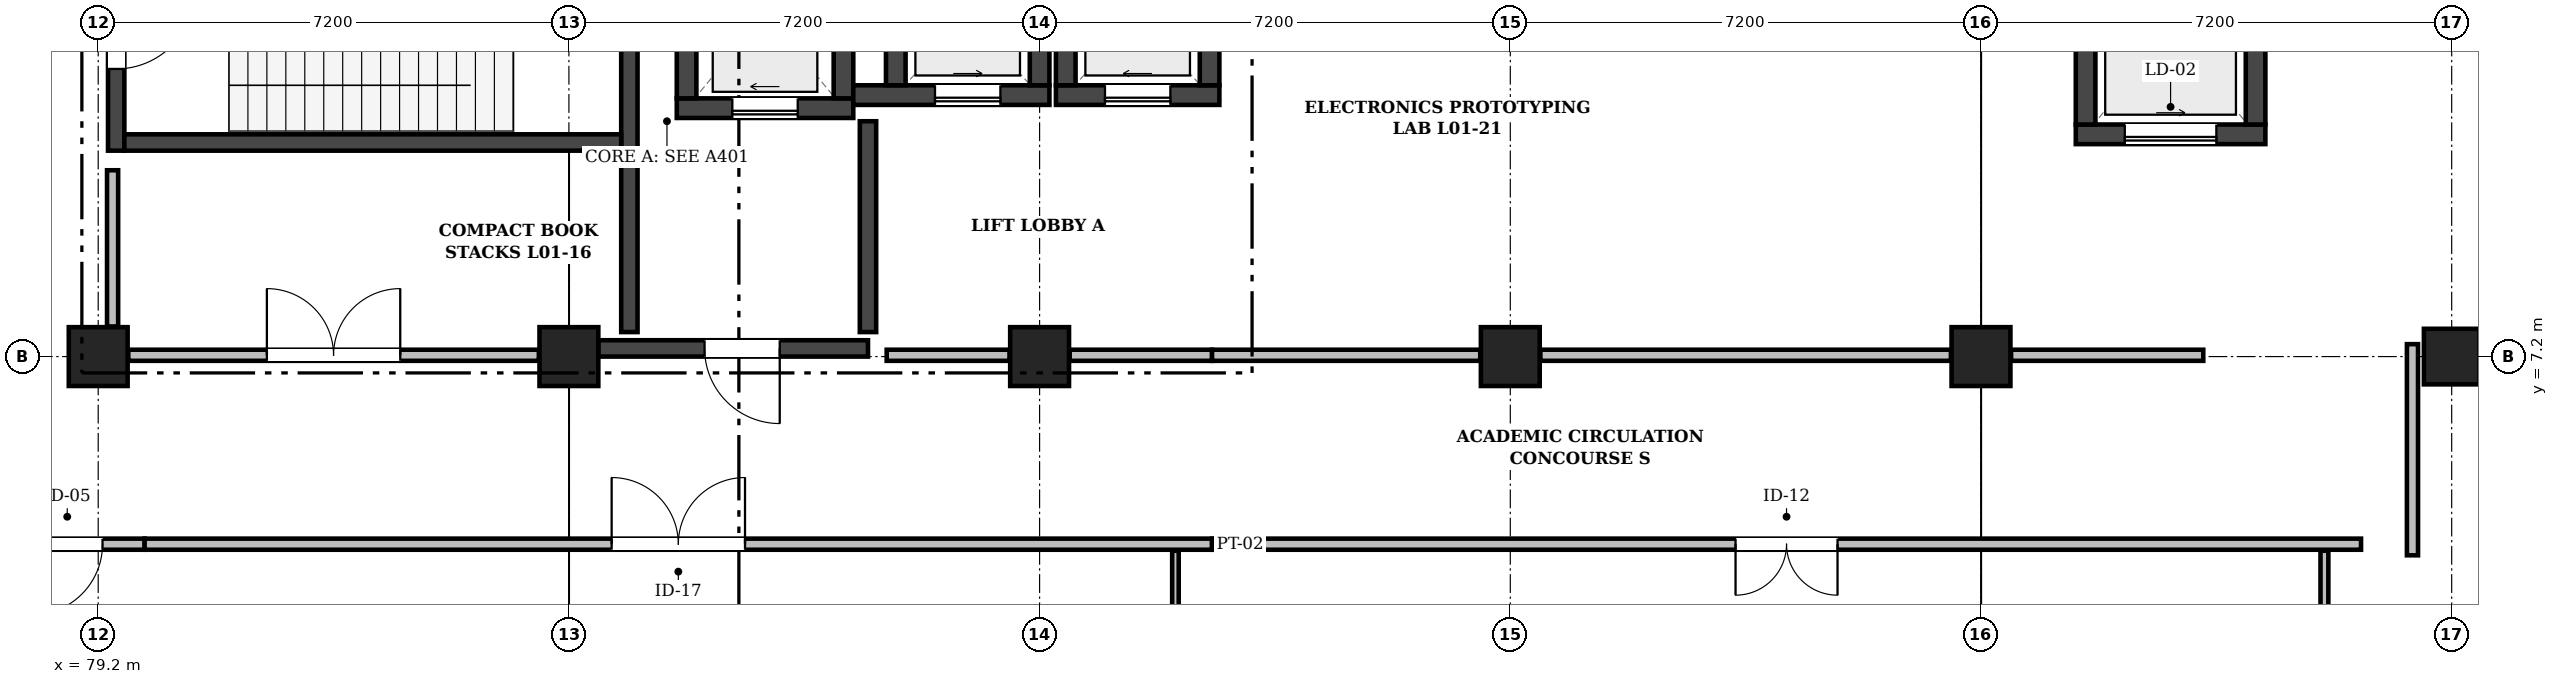
"""IFC4 building model, lengths in metres.
Left out: names, types, materials, properties, quantities, classifications, styles, units other than length and angle.
Written with IfcOpenShell. Run it as: python <this file> out.ifc"""

import sys

from ifc_helpers import new_model, si_unit, direction, frame, frame_2d, origin, origin_2d, place, context, subcontext, project, spatial, rectangle, extrude, element, fill, save


model = new_model("IFC4")
c1 = context("Model", 3, precision=1e-05, world=origin(), true_north=direction((0.0, 1.0)))
c2 = subcontext(c1, "Body", "Model", "MODEL_VIEW")
j1 = project(units=[si_unit("LENGTHUNIT", "METRE"), si_unit("PLANEANGLEUNIT", "RADIAN")], contexts=[c1])
p1 = place(None, origin())
s1 = spatial("IfcSite", under=j1, at=p1, CompositionType="ELEMENT")
p2 = place(p1, origin())
s2 = spatial("IfcBuilding", under=s1, at=p2, CompositionType="ELEMENT")
p3 = place(p2, frame((0.0, 0.0, 4.8)))
s3 = spatial("IfcBuildingStorey", under=s2, at=p3, CompositionType="ELEMENT", Elevation=4.8)
for number, where, z_axis, x_axis in (
    (1, (79.2, 7.2, 0.0), (0.0, 0.0, 1.0), (1.0, 0.0, 0.0)),
    (2, (86.4, 7.2, 0.0), (0.0, 0.0, 1.0), (1.0, 0.0, 0.0)),
    (3, (93.6, 7.2, 0.0), (0.0, 0.0, 1.0), (1.0, 0.0, 0.0)),
    (4, (100.8, 7.2, 0.0), (0.0, 0.0, 1.0), (1.0, 0.0, 0.0)),
    (5, (108.0, 7.2, 0.0), (0.0, 0.0, 1.0), (1.0, 0.0, 0.0)),
):
    element("IfcColumn", number, at=place(p3, frame(where, z_axis=z_axis, x_axis=x_axis)), inside=s3, PredefinedType="COLUMN", context=c2, shape_type="SweptSolid", body=[
        extrude(rectangle(XDim=0.9, YDim=0.9, at=origin_2d()), origin(), (0.0, 0.0, 1.0), 4.8),
    ])
p4 = place(p3, frame((115.2, 7.2, 0.0), z_axis=(0.0, 0.0, 1.0), x_axis=(1.0, 0.0, 0.0)))
e6 = element("IfcColumn", 6, at=p4, inside=s3, PredefinedType="COLUMN", context=c2, shape_type="SweptSolid", body=[
    extrude(rectangle(XDim=0.85, YDim=0.85, at=origin_2d()), origin(), (0.0, 0.0, 1.0), 4.8),
])
p5 = place(p3, frame((88.05, 11.0, 0.0), z_axis=(0.0, 0.0, 1.0), x_axis=(1.0, 0.0, 0.0)))
e7 = element("IfcWall", 7, at=p5, inside=s3, PredefinedType="SHEAR", context=c2, shape_type="SweptSolid", body=[
    extrude(rectangle(XDim=2.7, YDim=0.3, at=frame_2d((1.35, 0.0))), origin(), (0.0, 0.0, 1.0), 4.55),
])
p6 = place(p5, frame((0.85, 0.0, 0.0)))
e8 = element("IfcOpeningElement", 8, at=p6, cuts=e7, PredefinedType="OPENING", context=c2, shape_type="SweptSolid", body=[
    extrude(rectangle(XDim=1.0, YDim=2.1, at=frame_2d((0.5, 1.05))), frame((0.0, 0.162, 0.0), z_axis=(0.0, -1.0, 0.0), x_axis=(1.0, 0.0, 0.0)), (0.0, 0.0, 1.0), 0.324),
])
for number, where, z_axis, x_axis in (
    (9, (88.2, 11.15, 0.0), (0.0, 0.0, 1.0), (0.0, 1.0, 0.0)),
    (10, (90.6, 11.15, 0.0), (0.0, 0.0, 1.0), (0.0, 1.0, 0.0)),
):
    element("IfcWall", number, at=place(p3, frame(where, z_axis=z_axis, x_axis=x_axis)), inside=s3, PredefinedType="SHEAR", context=c2, shape_type="SweptSolid", body=[
        extrude(rectangle(XDim=2.6, YDim=0.3, at=frame_2d((1.3, 0.0))), origin(), (0.0, 0.0, 1.0), 4.55),
    ])
p7 = place(p3, frame((90.75, 11.2, 0.0), z_axis=(0.0, 0.0, 1.0), x_axis=(1.0, 0.0, 0.0)))
e11 = element("IfcWall", 11, at=p7, inside=s3, PredefinedType="SHEAR", context=c2, shape_type="SweptSolid", body=[
    extrude(rectangle(XDim=3.0, YDim=0.3, at=frame_2d((1.5, 0.0))), origin(), (0.0, 0.0, 1.0), 4.55),
])
p8 = place(p7, frame((1.25, 0.0, 0.0)))
e12 = element("IfcOpeningElement", 12, at=p8, cuts=e11, PredefinedType="OPENING", context=c2, shape_type="SweptSolid", body=[
    extrude(rectangle(XDim=1.0, YDim=2.1, at=frame_2d((0.5, 1.05))), frame((0.0, 0.162, 0.0), z_axis=(0.0, -1.0, 0.0), x_axis=(1.0, 0.0, 0.0)), (0.0, 0.0, 1.0), 0.324),
])
for number, where, z_axis, x_axis in (
    (13, (91.4, 11.35, 0.0), (0.0, 0.0, 1.0), (0.0, 1.0, 0.0)),
    (14, (93.6, 11.35, 0.0), (0.0, 0.0, 1.0), (0.0, 1.0, 0.0)),
):
    element("IfcWall", number, at=place(p3, frame(where, z_axis=z_axis, x_axis=x_axis)), inside=s3, PredefinedType="SHEAR", context=c2, shape_type="SweptSolid", body=[
        extrude(rectangle(XDim=2.1, YDim=0.3, at=frame_2d((1.05, 0.0))), origin(), (0.0, 0.0, 1.0), 4.55),
    ])
p9 = place(p3, frame((93.85, 11.2, 0.0), z_axis=(0.0, 0.0, 1.0), x_axis=(1.0, 0.0, 0.0)))
e15 = element("IfcWall", 15, at=p9, inside=s3, PredefinedType="SHEAR", context=c2, shape_type="SweptSolid", body=[
    extrude(rectangle(XDim=2.5, YDim=0.3, at=frame_2d((1.25, 0.0))), origin(), (0.0, 0.0, 1.0), 4.55),
])
p10 = place(p9, frame((0.75, 0.0, 0.0)))
e16 = element("IfcOpeningElement", 16, at=p10, cuts=e15, PredefinedType="OPENING", context=c2, shape_type="SweptSolid", body=[
    extrude(rectangle(XDim=1.0, YDim=2.1, at=frame_2d((0.5, 1.05))), frame((0.0, 0.162, 0.0), z_axis=(0.0, -1.0, 0.0), x_axis=(1.0, 0.0, 0.0)), (0.0, 0.0, 1.0), 0.324),
])
for number, where, z_axis, x_axis in (
    (17, (94.0, 11.35, 0.0), (0.0, 0.0, 1.0), (0.0, 1.0, 0.0)),
    (18, (96.2, 11.35, 0.0), (0.0, 0.0, 1.0), (0.0, 1.0, 0.0)),
):
    element("IfcWall", number, at=place(p3, frame(where, z_axis=z_axis, x_axis=x_axis)), inside=s3, PredefinedType="SHEAR", context=c2, shape_type="SweptSolid", body=[
        extrude(rectangle(XDim=2.1, YDim=0.3, at=frame_2d((1.05, 0.0))), origin(), (0.0, 0.0, 1.0), 4.55),
    ])
p11 = place(p3, frame((109.45, 10.6, 0.0), z_axis=(0.0, 0.0, 1.0), x_axis=(1.0, 0.0, 0.0)))
e19 = element("IfcWall", 19, at=p11, inside=s3, PredefinedType="SHEAR", context=c2, shape_type="SweptSolid", body=[
    extrude(rectangle(XDim=2.9, YDim=0.3, at=frame_2d((1.45, 0.0))), origin(), (0.0, 0.0, 1.0), 4.55),
])
p12 = place(p11, frame((0.75, 0.0, 0.0)))
e20 = element("IfcOpeningElement", 20, at=p12, cuts=e19, PredefinedType="OPENING", context=c2, shape_type="SweptSolid", body=[
    extrude(rectangle(XDim=1.4, YDim=2.2, at=frame_2d((0.7, 1.1))), frame((0.0, 0.162, 0.0), z_axis=(0.0, -1.0, 0.0), x_axis=(1.0, 0.0, 0.0)), (0.0, 0.0, 1.0), 0.324),
])
for number, where, z_axis, x_axis in (
    (21, (109.6, 10.75, 0.0), (0.0, 0.0, 1.0), (0.0, 1.0, 0.0)),
    (22, (112.2, 10.75, 0.0), (0.0, 0.0, 1.0), (0.0, 1.0, 0.0)),
):
    element("IfcWall", number, at=place(p3, frame(where, z_axis=z_axis, x_axis=x_axis)), inside=s3, PredefinedType="SHEAR", context=c2, shape_type="SweptSolid", body=[
        extrude(rectangle(XDim=2.9, YDim=0.3, at=frame_2d((1.45, 0.0))), origin(), (0.0, 0.0, 1.0), 4.55),
    ])
p13 = place(p3, frame((79.475, 10.35, 0.0), z_axis=(0.0, 0.0, 1.0), x_axis=(0.0, 1.0, 0.0)))
e23 = element("IfcWall", 23, at=p13, inside=s3, PredefinedType="SHEAR", context=c2, shape_type="SweptSolid", body=[
    extrude(rectangle(XDim=3.7, YDim=0.25, at=frame_2d((1.85, 0.0))), origin(), (0.0, 0.0, 1.0), 4.55),
])
p14 = place(p13, frame((1.25, 0.0, 0.0)))
e24 = element("IfcOpeningElement", 24, at=p14, cuts=e23, PredefinedType="OPENING", context=c2, shape_type="SweptSolid", body=[
    extrude(rectangle(XDim=1.2, YDim=2.15, at=frame_2d((0.6, 1.075))), frame((0.0, 0.137, 0.0), z_axis=(0.0, -1.0, 0.0), x_axis=(1.0, 0.0, 0.0)), (0.0, 0.0, 1.0), 0.274),
])
p15 = place(p3, frame((87.325, 10.35, 0.0), z_axis=(0.0, 0.0, 1.0), x_axis=(0.0, 1.0, 0.0)))
e25 = element("IfcWall", 25, at=p15, inside=s3, PredefinedType="SHEAR", context=c2, shape_type="SweptSolid", body=[
    extrude(rectangle(XDim=3.7, YDim=0.25, at=frame_2d((1.85, 0.0))), origin(), (0.0, 0.0, 1.0), 4.55),
])
p16 = place(p3, frame((79.6, 10.475, 0.0), z_axis=(0.0, 0.0, 1.0), x_axis=(1.0, 0.0, 0.0)))
e26 = element("IfcWall", 26, at=p16, inside=s3, PredefinedType="SHEAR", context=c2, shape_type="SweptSolid", body=[
    extrude(rectangle(XDim=7.6, YDim=0.25, at=frame_2d((3.8, 0.0))), origin(), (0.0, 0.0, 1.0), 4.55),
])
p17 = place(p3, frame((86.85, 7.325, 0.0), z_axis=(0.0, 0.0, 1.0), x_axis=(1.0, 0.0, 0.0)))
e27 = element("IfcWall", 27, at=p17, inside=s3, PredefinedType="SHEAR", context=c2, shape_type="SweptSolid", body=[
    extrude(rectangle(XDim=4.125, YDim=0.25, at=frame_2d((2.062, 0.0))), origin(), (0.0, 0.0, 1.0), 4.55),
])
p18 = place(p17, frame((1.625, 0.0, 0.0)))
e28 = element("IfcOpeningElement", 28, at=p18, cuts=e27, PredefinedType="OPENING", context=c2, shape_type="SweptSolid", body=[
    extrude(rectangle(XDim=1.15, YDim=2.15, at=frame_2d((0.575, 1.075))), frame((0.0, 0.137, 0.0), z_axis=(0.0, -1.0, 0.0), x_axis=(1.0, 0.0, 0.0)), (0.0, 0.0, 1.0), 0.274),
])
p19 = place(p3, frame((87.325, 7.575, 0.0), z_axis=(0.0, 0.0, 1.0), x_axis=(0.0, 1.0, 0.0)))
e29 = element("IfcWall", 29, at=p19, inside=s3, PredefinedType="SHEAR", context=c2, shape_type="SweptSolid", body=[
    extrude(rectangle(XDim=2.77, YDim=0.25, at=frame_2d((1.385, 0.0))), origin(), (0.0, 0.0, 1.0), 4.55),
])
p20 = place(p3, frame((90.975, 7.575, 0.0), z_axis=(0.0, 0.0, 1.0), x_axis=(0.0, 1.0, 0.0)))
e30 = element("IfcWall", 30, at=p20, inside=s3, PredefinedType="SHEAR", context=c2, shape_type="SweptSolid", body=[
    extrude(rectangle(XDim=3.225, YDim=0.25, at=frame_2d((1.613, 0.0))), origin(), (0.0, 0.0, 1.0), 4.55),
])
p21 = place(p3, frame((79.42, 7.66, 0.0), z_axis=(0.0, 0.0, 1.0), x_axis=(0.0, 1.0, 0.0)))
e31 = element("IfcWall", 31, at=p21, inside=s3, PredefinedType="PARTITIONING", context=c2, shape_type="SweptSolid", body=[
    extrude(rectangle(XDim=2.39, YDim=0.17, at=frame_2d((1.195, 0.0))), origin(), (0.0, 0.0, 1.0), 4.08),
])
p22 = place(p3, frame((77.542, 4.33, 0.0), z_axis=(0.0, 0.0, 1.0), x_axis=(1.0, 0.0, 0.0)))
e32 = element("IfcWall", 32, at=p22, inside=s3, PredefinedType="PARTITIONING", context=c2, shape_type="SweptSolid", body=[
    extrude(rectangle(XDim=2.368, YDim=0.17, at=frame_2d((1.184, 0.0))), origin(), (0.0, 0.0, 1.0), 4.46),
])
p23 = place(p22, frame((0.644, 0.0, 0.0)))
e33 = element("IfcOpeningElement", 33, at=p23, cuts=e32, PredefinedType="OPENING", context=c2, shape_type="SweptSolid", body=[
    extrude(rectangle(XDim=1.08, YDim=2.2, at=frame_2d((0.54, 1.1))), frame((0.0, 0.097, 0.0), z_axis=(0.0, -1.0, 0.0), x_axis=(1.0, 0.0, 0.0)), (0.0, 0.0, 1.0), 0.194),
])
p24 = place(p3, frame((79.66, 7.22, 0.0), z_axis=(0.0, 0.0, 1.0), x_axis=(1.0, 0.0, 0.0)))
e34 = element("IfcWall", 34, at=p24, inside=s3, PredefinedType="PARTITIONING", context=c2, shape_type="SweptSolid", body=[
    extrude(rectangle(XDim=6.28, YDim=0.17, at=frame_2d((3.14, 0.0))), origin(), (0.0, 0.0, 1.0), 3.9),
])
p25 = place(p24, frame((2.12, 0.0, 0.0)))
e35 = element("IfcOpeningElement", 35, at=p25, cuts=e34, PredefinedType="OPENING", context=c2, shape_type="SweptSolid", body=[
    extrude(rectangle(XDim=2.04, YDim=2.34, at=frame_2d((1.02, 1.17))), frame((0.0, 0.097, 0.0), z_axis=(0.0, -1.0, 0.0), x_axis=(1.0, 0.0, 0.0)), (0.0, 0.0, 1.0), 0.194),
])
p26 = place(p3, frame((94.06, 7.22, 0.0), z_axis=(0.0, 0.0, 1.0), x_axis=(1.0, 0.0, 0.0)))
e36 = element("IfcWall", 36, at=p26, inside=s3, PredefinedType="PARTITIONING", context=c2, shape_type="SweptSolid", body=[
    extrude(rectangle(XDim=2.178, YDim=0.17, at=frame_2d((1.089, 0.0))), origin(), (0.0, 0.0, 1.0), 3.9),
])
p27 = place(p3, frame((91.261, 7.22, 0.0), z_axis=(0.0, 0.0, 1.0), x_axis=(1.0, 0.0, 0.0)))
e37 = element("IfcWall", 37, at=p27, inside=s3, PredefinedType="PARTITIONING", context=c2, shape_type="SweptSolid", body=[
    extrude(rectangle(XDim=1.879, YDim=0.17, at=frame_2d((0.939, 0.0))), origin(), (0.0, 0.0, 1.0), 3.9),
])
p28 = place(p3, frame((79.91, 4.33, 0.0), z_axis=(0.0, 0.0, 1.0), x_axis=(1.0, 0.0, 0.0)))
e38 = element("IfcWall", 38, at=p28, inside=s3, PredefinedType="PARTITIONING", context=c2, shape_type="SweptSolid", body=[
    extrude(rectangle(XDim=16.328, YDim=0.17, at=frame_2d((8.164, 0.0))), origin(), (0.0, 0.0, 1.0), 4.46),
])
p29 = place(p28, frame((7.144, 0.0, 0.0)))
e39 = element("IfcOpeningElement", 39, at=p29, cuts=e38, PredefinedType="OPENING", context=c2, shape_type="SweptSolid", body=[
    extrude(rectangle(XDim=2.04, YDim=2.34, at=frame_2d((1.02, 1.17))), frame((0.0, 0.097, 0.0), z_axis=(0.0, -1.0, 0.0), x_axis=(1.0, 0.0, 0.0)), (0.0, 0.0, 1.0), 0.194),
])
p30 = place(p3, frame((101.26, 7.22, 0.0), z_axis=(0.0, 0.0, 1.0), x_axis=(1.0, 0.0, 0.0)))
e40 = element("IfcWall", 40, at=p30, inside=s3, PredefinedType="PARTITIONING", context=c2, shape_type="SweptSolid", body=[
    extrude(rectangle(XDim=6.28, YDim=0.17, at=frame_2d((3.14, 0.0))), origin(), (0.0, 0.0, 1.0), 3.9),
])
p31 = place(p3, frame((96.238, 7.22, 0.0), z_axis=(0.0, 0.0, 1.0), x_axis=(1.0, 0.0, 0.0)))
e41 = element("IfcWall", 41, at=p31, inside=s3, PredefinedType="PARTITIONING", context=c2, shape_type="SweptSolid", body=[
    extrude(rectangle(XDim=4.102, YDim=0.17, at=frame_2d((2.051, 0.0))), origin(), (0.0, 0.0, 1.0), 3.9),
])
p32 = place(p3, frame((108.46, 7.22, 0.0), z_axis=(0.0, 0.0, 1.0), x_axis=(1.0, 0.0, 0.0)))
e42 = element("IfcWall", 42, at=p32, inside=s3, PredefinedType="PARTITIONING", context=c2, shape_type="SweptSolid", body=[
    extrude(rectangle(XDim=2.94, YDim=0.17, at=frame_2d((1.47, 0.0))), origin(), (0.0, 0.0, 1.0), 3.9),
])
p33 = place(p3, frame((96.238, 4.33, 0.0), z_axis=(0.0, 0.0, 1.0), x_axis=(1.0, 0.0, 0.0)))
e43 = element("IfcWall", 43, at=p33, inside=s3, PredefinedType="PARTITIONING", context=c2, shape_type="SweptSolid", body=[
    extrude(rectangle(XDim=17.575, YDim=0.17, at=frame_2d((8.788, 0.0))), origin(), (0.0, 0.0, 1.0), 4.46),
])
p34 = place(p33, frame((8.008, 0.0, 0.0)))
e44 = element("IfcOpeningElement", 44, at=p34, cuts=e43, PredefinedType="OPENING", context=c2, shape_type="SweptSolid", body=[
    extrude(rectangle(XDim=1.56, YDim=2.26, at=frame_2d((0.78, 1.13))), frame((0.0, 0.097, 0.0), z_axis=(0.0, -1.0, 0.0), x_axis=(1.0, 0.0, 0.0)), (0.0, 0.0, 1.0), 0.194),
])
p35 = place(p3, frame((114.6, 4.16, 0.0), z_axis=(0.0, 0.0, 1.0), x_axis=(0.0, 1.0, 0.0)))
e45 = element("IfcWall", 45, at=p35, inside=s3, PredefinedType="PARTITIONING", context=c2, shape_type="SweptSolid", body=[
    extrude(rectangle(XDim=3.23, YDim=0.17, at=frame_2d((1.615, 0.0))), origin(), (0.0, 0.0, 1.0), 4.46),
])
p36 = place(p3, frame((95.678, 0.162, 0.0), z_axis=(0.0, 0.0, 1.0), x_axis=(0.0, 1.0, 0.0)))
e46 = element("IfcWall", 46, at=p36, inside=s3, PredefinedType="PARTITIONING", context=c2, shape_type="SweptSolid", body=[
    extrude(rectangle(XDim=4.068, YDim=0.1, at=frame_2d((2.034, 0.0))), origin(), (0.0, 0.0, 1.0), 4.46),
])
p37 = place(p3, frame((113.253, 0.162, 0.0), z_axis=(0.0, 0.0, 1.0), x_axis=(0.0, 1.0, 0.0)))
e47 = element("IfcWall", 47, at=p37, inside=s3, PredefinedType="PARTITIONING", context=c2, shape_type="SweptSolid", body=[
    extrude(rectangle(XDim=4.068, YDim=0.12, at=frame_2d((2.034, 0.0))), origin(), (0.0, 0.0, 1.0), 4.46),
])
p38 = place(p6, frame((1.0, 0.0, 0.0), z_axis=(0.0, 0.0, 1.0), x_axis=(-1.0, 0.0, 0.0)))
e48 = element("IfcDoor", 48, at=p38, inside=s3, OperationType="SLIDING_TO_LEFT", PredefinedType="DOOR", context=c2, shape_type="SweptSolid", body=[
    extrude(rectangle(XDim=1.0, YDim=2.1, at=frame_2d((0.5, 1.05))), frame((0.0, 0.025, 0.0), z_axis=(0.0, -1.0, 0.0), x_axis=(1.0, 0.0, 0.0)), (0.0, 0.0, 1.0), 0.05),
])
fill(e8, e48)
p39 = place(p8, frame((1.0, 0.0, 0.0), z_axis=(0.0, 0.0, 1.0), x_axis=(-1.0, 0.0, 0.0)))
e49 = element("IfcDoor", 49, at=p39, inside=s3, OperationType="SLIDING_TO_RIGHT", PredefinedType="DOOR", context=c2, shape_type="SweptSolid", body=[
    extrude(rectangle(XDim=1.0, YDim=2.1, at=frame_2d((0.5, 1.05))), frame((0.0, 0.025, 0.0), z_axis=(0.0, -1.0, 0.0), x_axis=(1.0, 0.0, 0.0)), (0.0, 0.0, 1.0), 0.05),
])
fill(e12, e49)
p40 = place(p10, frame((1.0, 0.0, 0.0), z_axis=(0.0, 0.0, 1.0), x_axis=(-1.0, 0.0, 0.0)))
e50 = element("IfcDoor", 50, at=p40, inside=s3, OperationType="SLIDING_TO_LEFT", PredefinedType="DOOR", context=c2, shape_type="SweptSolid", body=[
    extrude(rectangle(XDim=1.0, YDim=2.1, at=frame_2d((0.5, 1.05))), frame((0.0, 0.025, 0.0), z_axis=(0.0, -1.0, 0.0), x_axis=(1.0, 0.0, 0.0)), (0.0, 0.0, 1.0), 0.05),
])
fill(e16, e50)
p41 = place(p12, frame((1.4, 0.0, 0.0), z_axis=(0.0, 0.0, 1.0), x_axis=(-1.0, 0.0, 0.0)))
e51 = element("IfcDoor", 51, at=p41, inside=s3, OperationType="SLIDING_TO_RIGHT", PredefinedType="DOOR", context=c2, shape_type="SweptSolid", body=[
    extrude(rectangle(XDim=1.4, YDim=2.2, at=frame_2d((0.7, 1.1))), frame((0.0, 0.025, 0.0), z_axis=(0.0, -1.0, 0.0), x_axis=(1.0, 0.0, 0.0)), (0.0, 0.0, 1.0), 0.05),
])
fill(e20, e51)
p42 = place(p14, frame((1.2, 0.0, 0.0), z_axis=(0.0, 0.0, 1.0), x_axis=(-1.0, 0.0, 0.0)))
e52 = element("IfcDoor", 52, at=p42, inside=s3, OperationType="SINGLE_SWING_LEFT", PredefinedType="DOOR", context=c2, shape_type="SweptSolid", body=[
    extrude(rectangle(XDim=1.2, YDim=2.15, at=frame_2d((0.6, 1.075))), frame((0.0, 0.025, 0.0), z_axis=(0.0, -1.0, 0.0), x_axis=(1.0, 0.0, 0.0)), (0.0, 0.0, 1.0), 0.05),
])
fill(e24, e52)
p43 = place(p18, frame((1.15, 0.0, 0.0), z_axis=(0.0, 0.0, 1.0), x_axis=(-1.0, 0.0, 0.0)))
e53 = element("IfcDoor", 53, at=p43, inside=s3, OperationType="SINGLE_SWING_LEFT", PredefinedType="DOOR", context=c2, shape_type="SweptSolid", body=[
    extrude(rectangle(XDim=1.15, YDim=2.15, at=frame_2d((0.575, 1.075))), frame((0.0, 0.025, 0.0), z_axis=(0.0, -1.0, 0.0), x_axis=(1.0, 0.0, 0.0)), (0.0, 0.0, 1.0), 0.05),
])
fill(e28, e53)
p44 = place(p29, origin())
e54 = element("IfcDoor", 54, at=p44, inside=s3, OperationType="DOUBLE_DOOR_SINGLE_SWING", PredefinedType="DOOR", context=c2, shape_type="SweptSolid", body=[
    extrude(rectangle(XDim=2.04, YDim=2.34, at=frame_2d((1.02, 1.17))), frame((0.0, 0.025, 0.0), z_axis=(0.0, -1.0, 0.0), x_axis=(1.0, 0.0, 0.0)), (0.0, 0.0, 1.0), 0.05),
])
fill(e39, e54)
p45 = place(p25, origin())
e55 = element("IfcDoor", 55, at=p45, inside=s3, OperationType="DOUBLE_DOOR_SINGLE_SWING", PredefinedType="DOOR", context=c2, shape_type="SweptSolid", body=[
    extrude(rectangle(XDim=2.04, YDim=2.34, at=frame_2d((1.02, 1.17))), frame((0.0, 0.025, 0.0), z_axis=(0.0, -1.0, 0.0), x_axis=(1.0, 0.0, 0.0)), (0.0, 0.0, 1.0), 0.05),
])
fill(e35, e55)
p46 = place(p23, frame((1.08, 0.0, 0.0), z_axis=(0.0, 0.0, 1.0), x_axis=(-1.0, 0.0, 0.0)))
e56 = element("IfcDoor", 56, at=p46, inside=s3, OperationType="SINGLE_SWING_RIGHT", PredefinedType="DOOR", context=c2, shape_type="SweptSolid", body=[
    extrude(rectangle(XDim=1.08, YDim=2.2, at=frame_2d((0.54, 1.1))), frame((0.0, 0.025, 0.0), z_axis=(0.0, -1.0, 0.0), x_axis=(1.0, 0.0, 0.0)), (0.0, 0.0, 1.0), 0.05),
])
fill(e33, e56)
p47 = place(p34, frame((1.56, 0.0, 0.0), z_axis=(0.0, 0.0, 1.0), x_axis=(-1.0, 0.0, 0.0)))
e57 = element("IfcDoor", 57, at=p47, inside=s3, OperationType="DOUBLE_DOOR_SINGLE_SWING", PredefinedType="DOOR", context=c2, shape_type="SweptSolid", body=[
    extrude(rectangle(XDim=1.56, YDim=2.26, at=frame_2d((0.78, 1.13))), frame((0.0, 0.025, 0.0), z_axis=(0.0, -1.0, 0.0), x_axis=(1.0, 0.0, 0.0)), (0.0, 0.0, 1.0), 0.05),
])
fill(e44, e57)
save(model, sys.argv[1])
